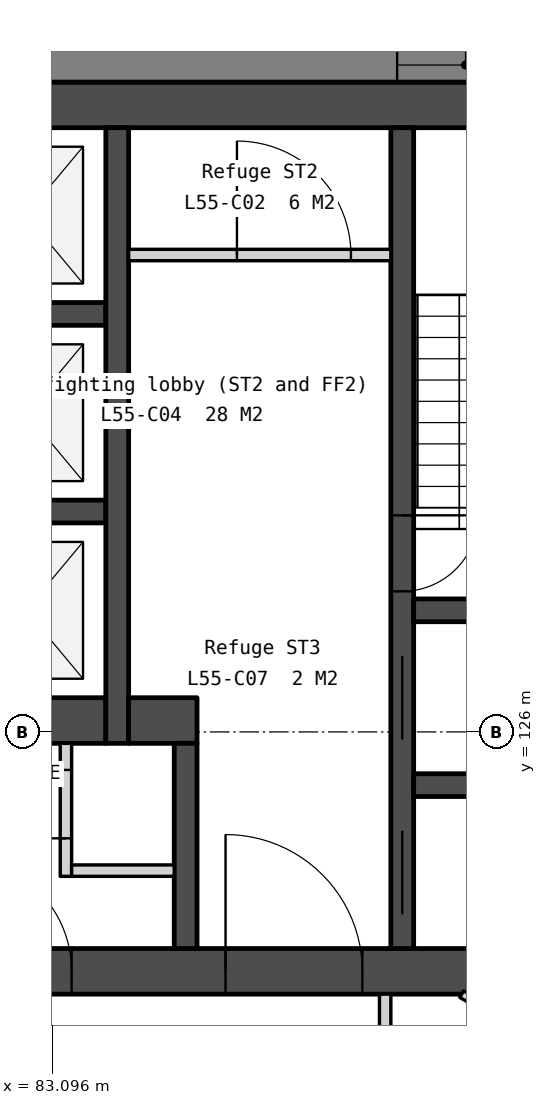
"""IFC4 building model, lengths in metres.
Left out: names, types, materials, properties, quantities, classifications, styles, units other than length and angle.
Written with IfcOpenShell. Run it as: python <this file> out.ifc"""

import sys

from ifc_helpers import new_model, si_unit, direction, frame, frame_2d, origin, place, context, subcontext, project, spatial, polyline, rectangle, outline, extrude, element, fill, save


model = new_model("IFC4")
c1 = context("Model", 3, precision=1e-05, world=origin(), true_north=direction((0.0, 1.0)))
c2 = subcontext(c1, "Body", "Model", "MODEL_VIEW")
j1 = project(units=[si_unit("LENGTHUNIT", "METRE"), si_unit("PLANEANGLEUNIT", "RADIAN")], contexts=[c1])
p1 = place(None, origin())
s1 = spatial("IfcSite", under=j1, at=p1, CompositionType="ELEMENT")
p2 = place(p1, origin())
s2 = spatial("IfcBuilding", under=s1, at=p2, CompositionType="ELEMENT")
p3 = place(p2, frame((0.0, 0.0, 219.2)))
s3 = spatial("IfcBuildingStorey", under=s2, at=p3, CompositionType="ELEMENT", Elevation=219.2)
p4 = place(p3, frame((69.0, 134.25, 0.0), z_axis=(0.0, 0.0, 1.0), x_axis=(1.0, 0.0, 0.0)))
e1 = element("IfcWall", 1, at=p4, inside=s3, PredefinedType="SOLIDWALL", context=c2, shape_type="SweptSolid", body=[
    extrude(rectangle(XDim=22.0, YDim=0.6, at=frame_2d((11.0, 0.0))), origin(), (0.0, 0.0, 1.0), 3.75),
])
p5 = place(p3, frame((69.0, 122.85, 0.0), z_axis=(0.0, 0.0, 1.0), x_axis=(1.0, 0.0, 0.0)))
e2 = element("IfcWall", 2, at=p5, inside=s3, PredefinedType="SOLIDWALL", context=c2, shape_type="SweptSolid", body=[
    extrude(rectangle(XDim=22.0, YDim=0.6, at=frame_2d((11.0, 0.0))), origin(), (0.0, 0.0, 1.0), 3.75),
])
p6 = place(p5, frame((16.375, 0.0, 0.0)))
e3 = element("IfcOpeningElement", 3, at=p6, cuts=e2, PredefinedType="OPENING", context=c2, shape_type="SweptSolid", body=[
    extrude(rectangle(XDim=1.8, YDim=2.1, at=frame_2d((0.9, 1.05))), frame((0.0, 0.31, 0.0), z_axis=(0.0, -1.0, 0.0), x_axis=(1.0, 0.0, 0.0)), (0.0, 0.0, 1.0), 0.62),
])
p7 = place(p5, frame((3.825, 0.0, 0.0)))
e4 = element("IfcOpeningElement", 4, at=p7, cuts=e2, PredefinedType="OPENING", context=c2, shape_type="SweptSolid", body=[
    extrude(rectangle(XDim=1.8, YDim=2.1, at=frame_2d((0.9, 1.05))), frame((0.0, 0.31, 0.0), z_axis=(0.0, -1.0, 0.0), x_axis=(1.0, 0.0, 0.0)), (0.0, 0.0, 1.0), 0.62),
])
p8 = place(p5, frame((12.85, 0.0, 0.0)))
e5 = element("IfcOpeningElement", 5, at=p8, cuts=e2, PredefinedType="OPENING", context=c2, shape_type="SweptSolid", body=[
    extrude(rectangle(XDim=1.5, YDim=2.1, at=frame_2d((0.75, 1.05))), frame((0.0, 0.31, 0.0), z_axis=(0.0, -1.0, 0.0), x_axis=(1.0, 0.0, 0.0)), (0.0, 0.0, 1.0), 0.62),
])
for number, where, z_axis, x_axis in (
    (6, (81.7, 131.5, 0.0), (0.0, 0.0, 1.0), (1.0, 0.0, 0.0)),
    (7, (81.7, 128.9, 0.0), (0.0, 0.0, 1.0), (1.0, 0.0, 0.0)),
):
    element("IfcWall", number, at=place(p3, frame(where, z_axis=z_axis, x_axis=x_axis)), inside=s3, PredefinedType="SOLIDWALL", context=c2, shape_type="SweptSolid", body=[
        extrude(rectangle(XDim=2.1, YDim=0.3, at=frame_2d((1.05, 0.0))), origin(), (0.0, 0.0, 1.0), 3.75),
    ])
p9 = place(p3, frame((82.9, 126.15, 0.0), z_axis=(0.0, 0.0, 1.0), x_axis=(1.0, 0.0, 0.0)))
e8 = element("IfcWall", 8, at=p9, inside=s3, PredefinedType="SOLIDWALL", context=c2, shape_type="SweptSolid", body=[
    extrude(rectangle(XDim=0.9, YDim=0.6, at=frame_2d((0.45, 0.0))), origin(), (0.0, 0.0, 1.0), 3.75),
])
p10 = place(p3, frame((83.275, 125.85, 0.0), z_axis=(0.0, 0.0, 1.0), x_axis=(0.0, -1.0, 0.0)))
e9 = element("IfcWall", 9, at=p10, inside=s3, PredefinedType="PARTITIONING", context=c2, shape_type="SweptSolid", body=[
    extrude(rectangle(XDim=1.75, YDim=0.15, at=frame_2d((0.875, 0.0))), origin(), (0.0, 0.0, 1.0), 3.75),
])
p11 = place(p10, frame((0.35, 0.0, 0.0)))
e10 = element("IfcOpeningElement", 10, at=p11, cuts=e9, PredefinedType="OPENING", context=c2, shape_type="SweptSolid", body=[
    extrude(rectangle(XDim=0.9, YDim=2.1, at=frame_2d((0.45, 1.05))), frame((0.0, 0.085, 0.0), z_axis=(0.0, -1.0, 0.0), x_axis=(1.0, 0.0, 0.0)), (0.0, 0.0, 1.0), 0.17),
])
p12 = place(p3, frame((83.35, 124.175, 0.0), z_axis=(0.0, 0.0, 1.0), x_axis=(1.0, 0.0, 0.0)))
e11 = element("IfcWall", 11, at=p12, inside=s3, PredefinedType="PARTITIONING", context=c2, shape_type="SweptSolid", body=[
    extrude(rectangle(XDim=1.35, YDim=0.15, at=frame_2d((0.675, 0.0))), origin(), (0.0, 0.0, 1.0), 3.75),
])
p13 = place(p3, frame((83.95, 133.95, 0.0), z_axis=(0.0, 0.0, 1.0), x_axis=(0.0, -1.0, 0.0)))
e12 = element("IfcWall", 12, at=p13, inside=s3, PredefinedType="SOLIDWALL", context=c2, shape_type="SweptSolid", body=[
    extrude(rectangle(XDim=8.1, YDim=0.3, at=frame_2d((4.05, 0.0))), origin(), (0.0, 0.0, 1.0), 3.75),
])
p14 = place(p3, frame((84.1, 132.275, 0.0), z_axis=(0.0, 0.0, 1.0), x_axis=(1.0, 0.0, 0.0)))
e13 = element("IfcWall", 13, at=p14, inside=s3, PredefinedType="PARTITIONING", context=c2, shape_type="SweptSolid", body=[
    extrude(rectangle(XDim=3.45, YDim=0.15, at=frame_2d((1.725, 0.0))), origin(), (0.0, 0.0, 1.0), 3.75),
])
p15 = place(p14, frame((1.425, 0.0, 0.0)))
e14 = element("IfcOpeningElement", 14, at=p15, cuts=e13, PredefinedType="OPENING", context=c2, shape_type="SweptSolid", body=[
    extrude(rectangle(XDim=1.5, YDim=2.1, at=frame_2d((0.75, 1.05))), frame((0.0, 0.085, 0.0), z_axis=(0.0, -1.0, 0.0), x_axis=(1.0, 0.0, 0.0)), (0.0, 0.0, 1.0), 0.17),
])
p16 = place(p3, frame((84.1, 126.15, 0.0), z_axis=(0.0, 0.0, 1.0), x_axis=(1.0, 0.0, 0.0)))
e15 = element("IfcWall", 15, at=p16, inside=s3, PredefinedType="SOLIDWALL", context=c2, shape_type="SweptSolid", body=[
    extrude(rectangle(XDim=0.9, YDim=0.6, at=frame_2d((0.45, 0.0))), origin(), (0.0, 0.0, 1.0), 3.75),
])
p17 = place(p3, frame((84.85, 125.85, 0.0), z_axis=(0.0, 0.0, 1.0), x_axis=(0.0, -1.0, 0.0)))
e16 = element("IfcWall", 16, at=p17, inside=s3, PredefinedType="SOLIDWALL", context=c2, shape_type="SweptSolid", body=[
    extrude(rectangle(XDim=2.7, YDim=0.3, at=frame_2d((1.35, 0.0))), origin(), (0.0, 0.0, 1.0), 3.75),
])
p18 = place(p3, frame((87.7, 133.95, 0.0), z_axis=(0.0, 0.0, 1.0), x_axis=(0.0, -1.0, 0.0)))
e17 = element("IfcWall", 17, at=p18, inside=s3, PredefinedType="SOLIDWALL", context=c2, shape_type="SweptSolid", body=[
    extrude(rectangle(XDim=10.8, YDim=0.3, at=frame_2d((5.4, 0.0))), origin(), (0.0, 0.0, 1.0), 3.75),
])
p19 = place(p18, frame((6.95, 0.0, 0.0)))
e18 = element("IfcOpeningElement", 18, at=p19, cuts=e17, PredefinedType="OPENING", context=c2, shape_type="SweptSolid", body=[
    extrude(rectangle(XDim=1.1, YDim=2.1, at=frame_2d((0.55, 1.05))), frame((0.0, 0.16, 0.0), z_axis=(0.0, -1.0, 0.0), x_axis=(1.0, 0.0, 0.0)), (0.0, 0.0, 1.0), 0.32),
])
p20 = place(p18, frame((5.1, 0.0, 0.0)))
e19 = element("IfcOpeningElement", 19, at=p20, cuts=e17, PredefinedType="OPENING", context=c2, shape_type="SweptSolid", body=[
    extrude(rectangle(XDim=1.0, YDim=2.1, at=frame_2d((0.5, 1.05))), frame((0.0, 0.16, 0.0), z_axis=(0.0, -1.0, 0.0), x_axis=(1.0, 0.0, 0.0)), (0.0, 0.0, 1.0), 0.32),
])
p21 = place(p18, frame((9.25, 0.0, 0.0)))
e20 = element("IfcOpeningElement", 20, at=p21, cuts=e17, PredefinedType="OPENING", context=c2, shape_type="SweptSolid", body=[
    extrude(rectangle(XDim=1.1, YDim=2.1, at=frame_2d((0.55, 1.05))), frame((0.0, 0.16, 0.0), z_axis=(0.0, -1.0, 0.0), x_axis=(1.0, 0.0, 0.0)), (0.0, 0.0, 1.0), 0.32),
])
for number, where, z_axis, x_axis in (
    (21, (87.85, 127.6, 0.0), (0.0, 0.0, 1.0), (1.0, 0.0, 0.0)),
    (22, (87.85, 125.3, 0.0), (0.0, 0.0, 1.0), (1.0, 0.0, 0.0)),
):
    element("IfcWall", number, at=place(p3, frame(where, z_axis=z_axis, x_axis=x_axis)), inside=s3, PredefinedType="SOLIDWALL", context=c2, shape_type="SweptSolid", body=[
        extrude(rectangle(XDim=2.55, YDim=0.3, at=frame_2d((1.275, 0.0))), origin(), (0.0, 0.0, 1.0), 3.75),
    ])
p22 = place(p3, frame((99.365, 134.775, -0.15), z_axis=(0.0, 0.0, 1.0), x_axis=(-1.0, 0.0, 0.0)))
e23 = element("IfcWall", 23, at=p22, inside=s3, PredefinedType="SOLIDWALL", context=c2, shape_type="SweptSolid", body=[
    extrude(outline(polyline([(38.729, 0.0), (38.729, 3.9), (0.0, 3.9), (0.0, 0.0), (38.729, 0.0)])), frame((0.0, 0.225, 0.0), z_axis=(0.0, -1.0, 0.0), x_axis=(1.0, 0.0, 0.0)), (0.0, 0.0, 1.0), 0.45),
])
p23 = place(p22, frame((0.807, 0.0, 0.95)))
e24 = element("IfcOpeningElement", 24, at=p23, cuts=e23, PredefinedType="OPENING", context=c2, shape_type="SweptSolid", body=[
    extrude(rectangle(XDim=1.2, YDim=2.2, at=frame_2d((0.6, 1.1))), frame((0.0, 0.235, 0.0), z_axis=(0.0, -1.0, 0.0), x_axis=(1.0, 0.0, 0.0)), (0.0, 0.0, 1.0), 0.47),
])
p24 = place(p22, frame((7.632, 0.0, 0.95)))
e25 = element("IfcOpeningElement", 25, at=p24, cuts=e23, PredefinedType="OPENING", context=c2, shape_type="SweptSolid", body=[
    extrude(rectangle(XDim=1.8, YDim=2.2, at=frame_2d((0.9, 1.1))), frame((0.0, 0.235, 0.0), z_axis=(0.0, -1.0, 0.0), x_axis=(1.0, 0.0, 0.0)), (0.0, 0.0, 1.0), 0.47),
])
p25 = place(p22, frame((9.932, 0.0, 0.95)))
e26 = element("IfcOpeningElement", 26, at=p25, cuts=e23, PredefinedType="OPENING", context=c2, shape_type="SweptSolid", body=[
    extrude(rectangle(XDim=1.8, YDim=2.2, at=frame_2d((0.9, 1.1))), frame((0.0, 0.235, 0.0), z_axis=(0.0, -1.0, 0.0), x_axis=(1.0, 0.0, 0.0)), (0.0, 0.0, 1.0), 0.47),
])
p26 = place(p22, frame((17.315, 0.0, 0.95)))
e27 = element("IfcOpeningElement", 27, at=p26, cuts=e23, PredefinedType="OPENING", context=c2, shape_type="SweptSolid", body=[
    extrude(rectangle(XDim=1.8, YDim=2.2, at=frame_2d((0.9, 1.1))), frame((0.0, 0.235, 0.0), z_axis=(0.0, -1.0, 0.0), x_axis=(1.0, 0.0, 0.0)), (0.0, 0.0, 1.0), 0.47),
])
p27 = place(p22, frame((19.615, 0.0, 0.95)))
e28 = element("IfcOpeningElement", 28, at=p27, cuts=e23, PredefinedType="OPENING", context=c2, shape_type="SweptSolid", body=[
    extrude(rectangle(XDim=1.8, YDim=2.2, at=frame_2d((0.9, 1.1))), frame((0.0, 0.235, 0.0), z_axis=(0.0, -1.0, 0.0), x_axis=(1.0, 0.0, 0.0)), (0.0, 0.0, 1.0), 0.47),
])
p28 = place(p22, frame((26.997, 0.0, 0.95)))
e29 = element("IfcOpeningElement", 29, at=p28, cuts=e23, PredefinedType="OPENING", context=c2, shape_type="SweptSolid", body=[
    extrude(rectangle(XDim=1.8, YDim=2.2, at=frame_2d((0.9, 1.1))), frame((0.0, 0.235, 0.0), z_axis=(0.0, -1.0, 0.0), x_axis=(1.0, 0.0, 0.0)), (0.0, 0.0, 1.0), 0.47),
])
p29 = place(p22, frame((29.297, 0.0, 0.95)))
e30 = element("IfcOpeningElement", 30, at=p29, cuts=e23, PredefinedType="OPENING", context=c2, shape_type="SweptSolid", body=[
    extrude(rectangle(XDim=1.8, YDim=2.2, at=frame_2d((0.9, 1.1))), frame((0.0, 0.235, 0.0), z_axis=(0.0, -1.0, 0.0), x_axis=(1.0, 0.0, 0.0)), (0.0, 0.0, 1.0), 0.47),
])
p30 = place(p22, frame((36.722, 0.0, 0.95)))
e31 = element("IfcOpeningElement", 31, at=p30, cuts=e23, PredefinedType="OPENING", context=c2, shape_type="SweptSolid", body=[
    extrude(rectangle(XDim=1.2, YDim=2.2, at=frame_2d((0.6, 1.1))), frame((0.0, 0.235, 0.0), z_axis=(0.0, -1.0, 0.0), x_axis=(1.0, 0.0, 0.0)), (0.0, 0.0, 1.0), 0.47),
])
p31 = place(p3, frame((87.296, 108.658, -0.15), z_axis=(0.0, 0.0, 1.0), x_axis=(0.500003227337, 0.866023540472, 0.0)))
e32 = element("IfcWall", 32, at=p31, inside=s3, PredefinedType="SOLIDWALL", context=c2, shape_type="SweptSolid", body=[
    extrude(outline(polyline([(27.147, 3.9), (27.147, 0.0), (0.0, 0.0), (0.0, 3.9), (27.147, 3.9)])), frame((0.0, 0.225, 0.0), z_axis=(0.0, -1.0, 0.0), x_axis=(1.0, 0.0, 0.0)), (0.0, 0.0, 1.0), 0.45),
])
p32 = place(p31, frame((5.732, 0.0, 0.95)))
e33 = element("IfcOpeningElement", 33, at=p32, cuts=e32, PredefinedType="OPENING", context=c2, shape_type="SweptSolid", body=[
    extrude(rectangle(XDim=1.8, YDim=2.2, at=frame_2d((0.9, 1.1))), frame((0.0, 0.235, 0.0), z_axis=(0.0, -1.0, 0.0), x_axis=(1.0, 0.0, 0.0)), (0.0, 0.0, 1.0), 0.47),
])
p33 = place(p31, frame((8.032, 0.0, 0.95)))
e34 = element("IfcOpeningElement", 34, at=p33, cuts=e32, PredefinedType="OPENING", context=c2, shape_type="SweptSolid", body=[
    extrude(rectangle(XDim=1.8, YDim=2.2, at=frame_2d((0.9, 1.1))), frame((0.0, 0.235, 0.0), z_axis=(0.0, -1.0, 0.0), x_axis=(1.0, 0.0, 0.0)), (0.0, 0.0, 1.0), 0.47),
])
p34 = place(p31, frame((15.415, 0.0, 0.95)))
e35 = element("IfcOpeningElement", 35, at=p34, cuts=e32, PredefinedType="OPENING", context=c2, shape_type="SweptSolid", body=[
    extrude(rectangle(XDim=1.8, YDim=2.2, at=frame_2d((0.9, 1.1))), frame((0.0, 0.235, 0.0), z_axis=(0.0, -1.0, 0.0), x_axis=(1.0, 0.0, 0.0)), (0.0, 0.0, 1.0), 0.47),
])
p35 = place(p31, frame((17.715, 0.0, 0.95)))
e36 = element("IfcOpeningElement", 36, at=p35, cuts=e32, PredefinedType="OPENING", context=c2, shape_type="SweptSolid", body=[
    extrude(rectangle(XDim=1.8, YDim=2.2, at=frame_2d((0.9, 1.1))), frame((0.0, 0.235, 0.0), z_axis=(0.0, -1.0, 0.0), x_axis=(1.0, 0.0, 0.0)), (0.0, 0.0, 1.0), 0.47),
])
p36 = place(p31, frame((25.14, 0.0, 0.95)))
e37 = element("IfcOpeningElement", 37, at=p36, cuts=e32, PredefinedType="OPENING", context=c2, shape_type="SweptSolid", body=[
    extrude(rectangle(XDim=1.2, YDim=2.2, at=frame_2d((0.6, 1.1))), frame((0.0, 0.235, 0.0), z_axis=(0.0, -1.0, 0.0), x_axis=(1.0, 0.0, 0.0)), (0.0, 0.0, 1.0), 0.47),
])
p37 = place(p3, frame((88.482, 122.55, 0.0), z_axis=(0.0, 0.0, 1.0), x_axis=(0.866023511746, -0.500003277092, 0.0)))
e38 = element("IfcWall", 38, at=p37, inside=s3, PredefinedType="PARTITIONING", context=c2, shape_type="SweptSolid", body=[
    extrude(rectangle(XDim=5.694, YDim=0.1, at=frame_2d((2.847, 0.0))), origin(), (0.0, 0.0, 1.0), 3.75),
])
p38 = place(p37, frame((2.397, 0.0, 0.0)))
e39 = element("IfcOpeningElement", 39, at=p38, cuts=e38, PredefinedType="OPENING", context=c2, shape_type="SweptSolid", body=[
    extrude(rectangle(XDim=0.9, YDim=2.1, at=frame_2d((0.45, 1.05))), frame((0.0, 0.06, 0.0), z_axis=(0.0, -1.0, 0.0), x_axis=(1.0, 0.0, 0.0)), (0.0, 0.0, 1.0), 0.12),
])
p39 = place(p3, frame((87.475, 120.025, 0.0), z_axis=(0.0, 0.0, 1.0), x_axis=(9.6683747e-05, 0.999999995326, 0.0)))
e40 = element("IfcWall", 40, at=p39, inside=s3, PredefinedType="PARTITIONING", context=c2, shape_type="SweptSolid", body=[
    extrude(rectangle(XDim=2.525, YDim=0.15, at=frame_2d((1.263, 0.0))), origin(), (0.0, 0.0, 1.0), 3.75),
])
p40 = place(p19, origin())
e41 = element("IfcDoor", 41, at=p40, inside=s3, OperationType="SLIDING_TO_LEFT", PredefinedType="DOOR", context=c2, shape_type="SweptSolid", body=[
    extrude(rectangle(XDim=1.1, YDim=2.1, at=frame_2d((0.55, 1.05))), frame((0.0, 0.025, 0.0), z_axis=(0.0, -1.0, 0.0), x_axis=(1.0, 0.0, 0.0)), (0.0, 0.0, 1.0), 0.05),
])
fill(e18, e41)
p41 = place(p6, origin())
e42 = element("IfcDoor", 42, at=p41, inside=s3, OperationType="DOUBLE_DOOR_DOUBLE_SWING", PredefinedType="DOOR", context=c2, shape_type="SweptSolid", body=[
    extrude(rectangle(XDim=1.8, YDim=2.1, at=frame_2d((0.9, 1.05))), frame((0.0, 0.025, 0.0), z_axis=(0.0, -1.0, 0.0), x_axis=(1.0, 0.0, 0.0)), (0.0, 0.0, 1.0), 0.05),
])
fill(e3, e42)
p42 = place(p8, origin())
e43 = element("IfcDoor", 43, at=p42, inside=s3, OperationType="DOUBLE_DOOR_DOUBLE_SWING", PredefinedType="DOOR", context=c2, shape_type="SweptSolid", body=[
    extrude(rectangle(XDim=1.5, YDim=2.1, at=frame_2d((0.75, 1.05))), frame((0.0, 0.025, 0.0), z_axis=(0.0, -1.0, 0.0), x_axis=(1.0, 0.0, 0.0)), (0.0, 0.0, 1.0), 0.05),
])
fill(e5, e43)
p43 = place(p11, origin())
e44 = element("IfcDoor", 44, at=p43, inside=s3, OperationType="SINGLE_SWING_RIGHT", PredefinedType="DOOR", context=c2, shape_type="SweptSolid", body=[
    extrude(rectangle(XDim=0.9, YDim=2.1, at=frame_2d((0.45, 1.05))), frame((0.0, 0.025, 0.0), z_axis=(0.0, -1.0, 0.0), x_axis=(1.0, 0.0, 0.0)), (0.0, 0.0, 1.0), 0.05),
])
fill(e10, e44)
p44 = place(p15, origin())
e45 = element("IfcDoor", 45, at=p44, inside=s3, OperationType="DOUBLE_DOOR_DOUBLE_SWING", PredefinedType="DOOR", context=c2, shape_type="SweptSolid", body=[
    extrude(rectangle(XDim=1.5, YDim=2.1, at=frame_2d((0.75, 1.05))), frame((0.0, 0.025, 0.0), z_axis=(0.0, -1.0, 0.0), x_axis=(1.0, 0.0, 0.0)), (0.0, 0.0, 1.0), 0.05),
])
fill(e14, e45)
p45 = place(p20, origin())
e46 = element("IfcDoor", 46, at=p45, inside=s3, OperationType="SINGLE_SWING_LEFT", PredefinedType="DOOR", context=c2, shape_type="SweptSolid", body=[
    extrude(rectangle(XDim=1.0, YDim=2.1, at=frame_2d((0.5, 1.05))), frame((0.0, 0.025, 0.0), z_axis=(0.0, -1.0, 0.0), x_axis=(1.0, 0.0, 0.0)), (0.0, 0.0, 1.0), 0.05),
])
fill(e19, e46)
p46 = place(p21, origin())
e47 = element("IfcDoor", 47, at=p46, inside=s3, OperationType="SLIDING_TO_LEFT", PredefinedType="DOOR", context=c2, shape_type="SweptSolid", body=[
    extrude(rectangle(XDim=1.1, YDim=2.1, at=frame_2d((0.55, 1.05))), frame((0.0, 0.025, 0.0), z_axis=(0.0, -1.0, 0.0), x_axis=(1.0, 0.0, 0.0)), (0.0, 0.0, 1.0), 0.05),
])
fill(e20, e47)
p47 = place(p25, origin())
e48 = element("IfcWindow", 48, at=p47, inside=s3, PartitioningType="SINGLE_PANEL", PredefinedType="WINDOW", context=c2, shape_type="SweptSolid", body=[
    extrude(rectangle(XDim=1.8, YDim=2.2, at=frame_2d((0.9, 1.1))), frame((0.0, 0.03, 0.0), z_axis=(0.0, -1.0, 0.0), x_axis=(1.0, 0.0, 0.0)), (0.0, 0.0, 1.0), 0.06),
])
fill(e26, e48)
save(model, sys.argv[1])
